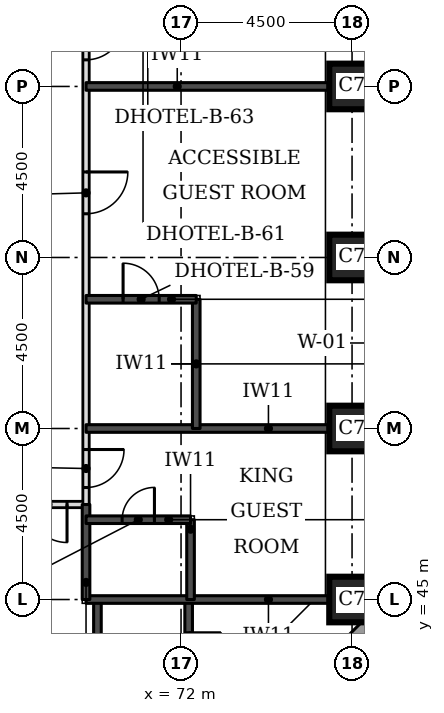
"""IFC4 building model, lengths in metres.
Left out: names, types, materials, properties, quantities, classifications, styles, units other than length and angle.
Written with IfcOpenShell. Run it as: python <this file> out.ifc"""

import sys

from ifc_helpers import new_model, si_unit, direction, frame, frame_2d, origin, origin_2d, place, context, subcontext, project, spatial, rectangle, extrude, element, fill, save


model = new_model("IFC4")
c1 = context("Model", 3, precision=1e-05, world=origin(), true_north=direction((0.0, 1.0)))
c2 = subcontext(c1, "Body", "Model", "MODEL_VIEW")
j1 = project(units=[si_unit("LENGTHUNIT", "METRE"), si_unit("PLANEANGLEUNIT", "RADIAN")], contexts=[c1])
p1 = place(None, origin())
s1 = spatial("IfcSite", under=j1, at=p1, CompositionType="ELEMENT")
p2 = place(p1, origin())
s2 = spatial("IfcBuilding", under=s1, at=p2, CompositionType="ELEMENT")
p3 = place(p2, frame((0.0, 0.0, 29.7)))
s3 = spatial("IfcBuildingStorey", under=s2, at=p3, CompositionType="ELEMENT", Elevation=29.7)
for number, where, z_axis, x_axis in (
    (1, (76.5, 45.0, 0.0), (0.0, 0.0, 1.0), (1.0, 0.0, 0.0)),
    (2, (76.5, 49.5, 0.0), (0.0, 0.0, 1.0), (1.0, 0.0, 0.0)),
    (3, (76.5, 54.0, 0.0), (0.0, 0.0, 1.0), (1.0, 0.0, 0.0)),
    (4, (76.5, 58.5, 0.0), (0.0, 0.0, 1.0), (1.0, 0.0, 0.0)),
):
    element("IfcColumn", number, at=place(p3, frame(where, z_axis=z_axis, x_axis=x_axis)), inside=s3, PredefinedType="COLUMN", context=c2, shape_type="SweptSolid", body=[
        extrude(rectangle(XDim=1.2, YDim=1.2, at=origin_2d()), origin(), (0.0, 0.0, 1.0), 3.3),
    ])
p4 = place(p3, frame((72.27, 39.674, 0.0), z_axis=(0.0, 0.0, 1.0), x_axis=(0.707106781187, 0.707106781187, 0.0)))
e5 = element("IfcWall", 5, at=p4, inside=s3, PredefinedType="STANDARD", context=c2, shape_type="SweptSolid", body=[
    extrude(rectangle(XDim=7.151, YDim=0.35, at=frame_2d((3.576, 0.0))), origin(), (0.0, 0.0, 1.0), 3.055),
])
p5 = place(p4, frame((1.926, 0.0, 0.8)))
e6 = element("IfcOpeningElement", 6, at=p5, cuts=e5, PredefinedType="OPENING", context=c2, shape_type="SweptSolid", body=[
    extrude(rectangle(XDim=3.3, YDim=1.5, at=frame_2d((1.65, 0.75))), frame((0.0, 0.185, 0.0), z_axis=(0.0, -1.0, 0.0), x_axis=(1.0, 0.0, 0.0)), (0.0, 0.0, 1.0), 0.37),
])
p6 = place(p3, frame((52.85, 47.5, 0.0), z_axis=(0.0, 0.0, 1.0), x_axis=(1.0, 0.0, 0.0)))
e7 = element("IfcWall", 7, at=p6, inside=s3, PredefinedType="PARTITIONING", context=c2, shape_type="SweptSolid", body=[
    extrude(rectangle(XDim=16.65, YDim=0.15, at=frame_2d((8.325, 0.0))), origin(), (0.0, 0.0, 1.0), 3.08),
])
p7 = place(p6, frame((11.3, 0.0, 0.0)))
e8 = element("IfcOpeningElement", 8, at=p7, cuts=e7, PredefinedType="OPENING", context=c2, shape_type="SweptSolid", body=[
    extrude(rectangle(XDim=1.1, YDim=2.1, at=frame_2d((0.55, 1.05))), frame((0.0, 0.085, 0.0), z_axis=(0.0, -1.0, 0.0), x_axis=(1.0, 0.0, 0.0)), (0.0, 0.0, 1.0), 0.17),
])
p8 = place(p6, frame((15.15, 0.0, 0.0)))
e9 = element("IfcOpeningElement", 9, at=p8, cuts=e7, PredefinedType="OPENING", context=c2, shape_type="SweptSolid", body=[
    extrude(rectangle(XDim=1.0, YDim=2.1, at=frame_2d((0.5, 1.05))), frame((0.0, 0.085, 0.0), z_axis=(0.0, -1.0, 0.0), x_axis=(1.0, 0.0, 0.0)), (0.0, 0.0, 1.0), 0.17),
])
p9 = place(p3, frame((69.5, 47.5, 0.0), z_axis=(0.0, 0.0, 1.0), x_axis=(0.0, 1.0, 0.0)))
e10 = element("IfcWall", 10, at=p9, inside=s3, PredefinedType="PARTITIONING", context=c2, shape_type="SweptSolid", body=[
    extrude(rectangle(XDim=26.5, YDim=0.15, at=frame_2d((13.25, 0.0))), origin(), (0.0, 0.0, 1.0), 3.08),
])
p10 = place(p9, frame((24.95, 0.0, 0.0)))
e11 = element("IfcOpeningElement", 11, at=p10, cuts=e10, PredefinedType="OPENING", context=c2, shape_type="SweptSolid", body=[
    extrude(rectangle(XDim=1.0, YDim=2.1, at=frame_2d((0.5, 1.05))), frame((0.0, 0.085, 0.0), z_axis=(0.0, -1.0, 0.0), x_axis=(1.0, 0.0, 0.0)), (0.0, 0.0, 1.0), 0.17),
])
p11 = place(p9, frame((20.7, 0.0, 0.0)))
e12 = element("IfcOpeningElement", 12, at=p11, cuts=e10, PredefinedType="OPENING", context=c2, shape_type="SweptSolid", body=[
    extrude(rectangle(XDim=1.0, YDim=2.1, at=frame_2d((0.5, 1.05))), frame((0.0, 0.085, 0.0), z_axis=(0.0, -1.0, 0.0), x_axis=(1.0, 0.0, 0.0)), (0.0, 0.0, 1.0), 0.17),
])
p12 = place(p9, frame((18.55, 0.0, 0.0)))
e13 = element("IfcOpeningElement", 13, at=p12, cuts=e10, PredefinedType="OPENING", context=c2, shape_type="SweptSolid", body=[
    extrude(rectangle(XDim=1.0, YDim=2.1, at=frame_2d((0.5, 1.05))), frame((0.0, 0.085, 0.0), z_axis=(0.0, -1.0, 0.0), x_axis=(1.0, 0.0, 0.0)), (0.0, 0.0, 1.0), 0.17),
])
p13 = place(p9, frame((11.7, 0.0, 0.0)))
e14 = element("IfcOpeningElement", 14, at=p13, cuts=e10, PredefinedType="OPENING", context=c2, shape_type="SweptSolid", body=[
    extrude(rectangle(XDim=1.0, YDim=2.1, at=frame_2d((0.5, 1.05))), frame((0.0, 0.085, 0.0), z_axis=(0.0, -1.0, 0.0), x_axis=(1.0, 0.0, 0.0)), (0.0, 0.0, 1.0), 0.17),
])
p14 = place(p9, frame((7.65, 0.0, 0.0)))
e15 = element("IfcOpeningElement", 15, at=p14, cuts=e10, PredefinedType="OPENING", context=c2, shape_type="SweptSolid", body=[
    extrude(rectangle(XDim=1.1, YDim=2.1, at=frame_2d((0.55, 1.05))), frame((0.0, 0.085, 0.0), z_axis=(0.0, -1.0, 0.0), x_axis=(1.0, 0.0, 0.0)), (0.0, 0.0, 1.0), 0.17),
])
p15 = place(p9, frame((0.447, 0.0, 0.0)))
e16 = element("IfcOpeningElement", 16, at=p15, cuts=e10, PredefinedType="OPENING", context=c2, shape_type="SweptSolid", body=[
    extrude(rectangle(XDim=1.0, YDim=2.1, at=frame_2d((0.5, 1.05))), frame((0.0, 0.085, 0.0), z_axis=(0.0, -1.0, 0.0), x_axis=(1.0, 0.0, 0.0)), (0.0, 0.0, 1.0), 0.17),
])
p16 = place(p3, frame((69.8, 42.5, 0.0), z_axis=(0.0, 0.0, 1.0), x_axis=(0.0, 1.0, 0.0)))
e17 = element("IfcWall", 17, at=p16, inside=s3, PredefinedType="SOLIDWALL", context=c2, shape_type="SweptSolid", body=[
    extrude(rectangle(XDim=2.5, YDim=0.2, at=frame_2d((1.25, 0.0))), origin(), (0.0, 0.0, 1.0), 3.08),
])
p17 = place(p3, frame((72.2, 42.5, 0.0), z_axis=(0.0, 0.0, 1.0), x_axis=(0.0, 1.0, 0.0)))
e18 = element("IfcWall", 18, at=p17, inside=s3, PredefinedType="SOLIDWALL", context=c2, shape_type="SweptSolid", body=[
    extrude(rectangle(XDim=2.5, YDim=0.2, at=frame_2d((1.25, 0.0))), origin(), (0.0, 0.0, 1.0), 3.08),
])
p18 = place(p17, frame((0.775, 0.0, 0.0)))
e19 = element("IfcOpeningElement", 19, at=p18, cuts=e18, PredefinedType="OPENING", context=c2, shape_type="SweptSolid", body=[
    extrude(rectangle(XDim=0.85, YDim=2.1, at=frame_2d((0.425, 1.05))), frame((0.0, 0.11, 0.0), z_axis=(0.0, -1.0, 0.0), x_axis=(1.0, 0.0, 0.0)), (0.0, 0.0, 1.0), 0.22),
])
p19 = place(p3, frame((69.5, 45.0, 0.0), z_axis=(0.0, 0.0, 1.0), x_axis=(1.0, 0.0, 0.0)))
e20 = element("IfcWall", 20, at=p19, inside=s3, PredefinedType="SOLIDWALL", context=c2, shape_type="SweptSolid", body=[
    extrude(rectangle(XDim=6.4, YDim=0.2, at=frame_2d((3.2, 0.0))), origin(), (0.0, 0.0, 1.0), 3.08),
])
p20 = place(p3, frame((69.5, 45.0, 0.0), z_axis=(0.0, 0.0, 1.0), x_axis=(0.0, 1.0, 0.0)))
e21 = element("IfcWall", 21, at=p20, inside=s3, PredefinedType="SOLIDWALL", context=c2, shape_type="SweptSolid", body=[
    extrude(rectangle(XDim=2.5, YDim=0.2, at=frame_2d((1.25, 0.0))), origin(), (0.0, 0.0, 1.0), 3.08),
])
p21 = place(p3, frame((72.25, 45.0, 0.0), z_axis=(0.0, 0.0, 1.0), x_axis=(0.0, 1.0, 0.0)))
e22 = element("IfcWall", 22, at=p21, inside=s3, PredefinedType="SOLIDWALL", context=c2, shape_type="SweptSolid", body=[
    extrude(rectangle(XDim=2.1, YDim=0.2, at=frame_2d((1.05, 0.0))), origin(), (0.0, 0.0, 1.0), 3.08),
])
p22 = place(p3, frame((69.5, 47.1, 0.0), z_axis=(0.0, 0.0, 1.0), x_axis=(1.0, 0.0, 0.0)))
e23 = element("IfcWall", 23, at=p22, inside=s3, PredefinedType="SOLIDWALL", context=c2, shape_type="SweptSolid", body=[
    extrude(rectangle(XDim=2.75, YDim=0.2, at=frame_2d((1.375, 0.0))), origin(), (0.0, 0.0, 1.0), 3.08),
])
p23 = place(p22, frame((0.95, 0.0, 0.0)))
e24 = element("IfcOpeningElement", 24, at=p23, cuts=e23, PredefinedType="OPENING", context=c2, shape_type="SweptSolid", body=[
    extrude(rectangle(XDim=0.85, YDim=2.1, at=frame_2d((0.425, 1.05))), frame((0.0, 0.11, 0.0), z_axis=(0.0, -1.0, 0.0), x_axis=(1.0, 0.0, 0.0)), (0.0, 0.0, 1.0), 0.22),
])
p24 = place(p3, frame((69.5, 49.5, 0.0), z_axis=(0.0, 0.0, 1.0), x_axis=(1.0, 0.0, 0.0)))
e25 = element("IfcWall", 25, at=p24, inside=s3, PredefinedType="SOLIDWALL", context=c2, shape_type="SweptSolid", body=[
    extrude(rectangle(XDim=6.4, YDim=0.2, at=frame_2d((3.2, 0.0))), origin(), (0.0, 0.0, 1.0), 3.08),
])
p25 = place(p3, frame((72.4, 49.5, 0.0), z_axis=(0.0, 0.0, 1.0), x_axis=(0.0, 1.0, 0.0)))
e26 = element("IfcWall", 26, at=p25, inside=s3, PredefinedType="SOLIDWALL", context=c2, shape_type="SweptSolid", body=[
    extrude(rectangle(XDim=3.4, YDim=0.2, at=frame_2d((1.7, 0.0))), origin(), (0.0, 0.0, 1.0), 3.08),
])
p26 = place(p3, frame((69.5, 52.9, 0.0), z_axis=(0.0, 0.0, 1.0), x_axis=(1.0, 0.0, 0.0)))
e27 = element("IfcWall", 27, at=p26, inside=s3, PredefinedType="SOLIDWALL", context=c2, shape_type="SweptSolid", body=[
    extrude(rectangle(XDim=2.9, YDim=0.2, at=frame_2d((1.45, 0.0))), origin(), (0.0, 0.0, 1.0), 3.08),
])
p27 = place(p26, frame((0.975, 0.0, 0.0)))
e28 = element("IfcOpeningElement", 28, at=p27, cuts=e27, PredefinedType="OPENING", context=c2, shape_type="SweptSolid", body=[
    extrude(rectangle(XDim=0.95, YDim=2.1, at=frame_2d((0.475, 1.05))), frame((0.0, 0.11, 0.0), z_axis=(0.0, -1.0, 0.0), x_axis=(1.0, 0.0, 0.0)), (0.0, 0.0, 1.0), 0.22),
])
p28 = place(p3, frame((69.5, 58.5, 0.0), z_axis=(0.0, 0.0, 1.0), x_axis=(1.0, 0.0, 0.0)))
e29 = element("IfcWall", 29, at=p28, inside=s3, PredefinedType="SOLIDWALL", context=c2, shape_type="SweptSolid", body=[
    extrude(rectangle(XDim=6.4, YDim=0.2, at=frame_2d((3.2, 0.0))), origin(), (0.0, 0.0, 1.0), 3.08),
])
p29 = place(p13, frame((1.0, 0.0, 0.0), z_axis=(0.0, 0.0, 1.0), x_axis=(-1.0, 0.0, 0.0)))
e30 = element("IfcDoor", 30, at=p29, inside=s3, OperationType="SINGLE_SWING_LEFT", PredefinedType="DOOR", context=c2, shape_type="SweptSolid", body=[
    extrude(rectangle(XDim=1.0, YDim=2.1, at=frame_2d((0.5, 1.05))), frame((0.0, 0.025, 0.0), z_axis=(0.0, -1.0, 0.0), x_axis=(1.0, 0.0, 0.0)), (0.0, 0.0, 1.0), 0.05),
])
fill(e14, e30)
p30 = place(p14, frame((1.1, 0.0, 0.0), z_axis=(0.0, 0.0, 1.0), x_axis=(-1.0, 0.0, 0.0)))
e31 = element("IfcDoor", 31, at=p30, inside=s3, OperationType="SINGLE_SWING_LEFT", PredefinedType="DOOR", context=c2, shape_type="SweptSolid", body=[
    extrude(rectangle(XDim=1.1, YDim=2.1, at=frame_2d((0.55, 1.05))), frame((0.0, 0.025, 0.0), z_axis=(0.0, -1.0, 0.0), x_axis=(1.0, 0.0, 0.0)), (0.0, 0.0, 1.0), 0.05),
])
fill(e15, e31)
p31 = place(p27, origin())
e32 = element("IfcDoor", 32, at=p31, inside=s3, OperationType="SINGLE_SWING_LEFT", PredefinedType="DOOR", context=c2, shape_type="SweptSolid", body=[
    extrude(rectangle(XDim=0.95, YDim=2.1, at=frame_2d((0.475, 1.05))), frame((0.0, 0.025, 0.0), z_axis=(0.0, -1.0, 0.0), x_axis=(1.0, 0.0, 0.0)), (0.0, 0.0, 1.0), 0.05),
])
fill(e28, e32)
p32 = place(p15, frame((1.0, 0.0, 0.0), z_axis=(0.0, 0.0, 1.0), x_axis=(-1.0, 0.0, 0.0)))
e33 = element("IfcDoor", 33, at=p32, inside=s3, OperationType="SINGLE_SWING_LEFT", PredefinedType="DOOR", context=c2, shape_type="SweptSolid", body=[
    extrude(rectangle(XDim=1.0, YDim=2.1, at=frame_2d((0.5, 1.05))), frame((0.0, 0.025, 0.0), z_axis=(0.0, -1.0, 0.0), x_axis=(1.0, 0.0, 0.0)), (0.0, 0.0, 1.0), 0.05),
])
fill(e16, e33)
p33 = place(p23, origin())
e34 = element("IfcDoor", 34, at=p33, inside=s3, OperationType="SINGLE_SWING_RIGHT", PredefinedType="DOOR", context=c2, shape_type="SweptSolid", body=[
    extrude(rectangle(XDim=0.85, YDim=2.1, at=frame_2d((0.425, 1.05))), frame((0.0, 0.025, 0.0), z_axis=(0.0, -1.0, 0.0), x_axis=(1.0, 0.0, 0.0)), (0.0, 0.0, 1.0), 0.05),
])
fill(e24, e34)
p34 = place(p8, frame((1.0, 0.0, 0.0), z_axis=(0.0, 0.0, 1.0), x_axis=(-1.0, 0.0, 0.0)))
e35 = element("IfcDoor", 35, at=p34, inside=s3, OperationType="SINGLE_SWING_LEFT", PredefinedType="DOOR", context=c2, shape_type="SweptSolid", body=[
    extrude(rectangle(XDim=1.0, YDim=2.1, at=frame_2d((0.5, 1.05))), frame((0.0, 0.025, 0.0), z_axis=(0.0, -1.0, 0.0), x_axis=(1.0, 0.0, 0.0)), (0.0, 0.0, 1.0), 0.05),
])
fill(e9, e35)
p35 = place(p18, frame((0.85, 0.0, 0.0), z_axis=(0.0, 0.0, 1.0), x_axis=(-1.0, 0.0, 0.0)))
e36 = element("IfcDoor", 36, at=p35, inside=s3, OperationType="SINGLE_SWING_LEFT", PredefinedType="DOOR", context=c2, shape_type="SweptSolid", body=[
    extrude(rectangle(XDim=0.85, YDim=2.1, at=frame_2d((0.425, 1.05))), frame((0.0, 0.025, 0.0), z_axis=(0.0, -1.0, 0.0), x_axis=(1.0, 0.0, 0.0)), (0.0, 0.0, 1.0), 0.05),
])
fill(e19, e36)
save(model, sys.argv[1])
